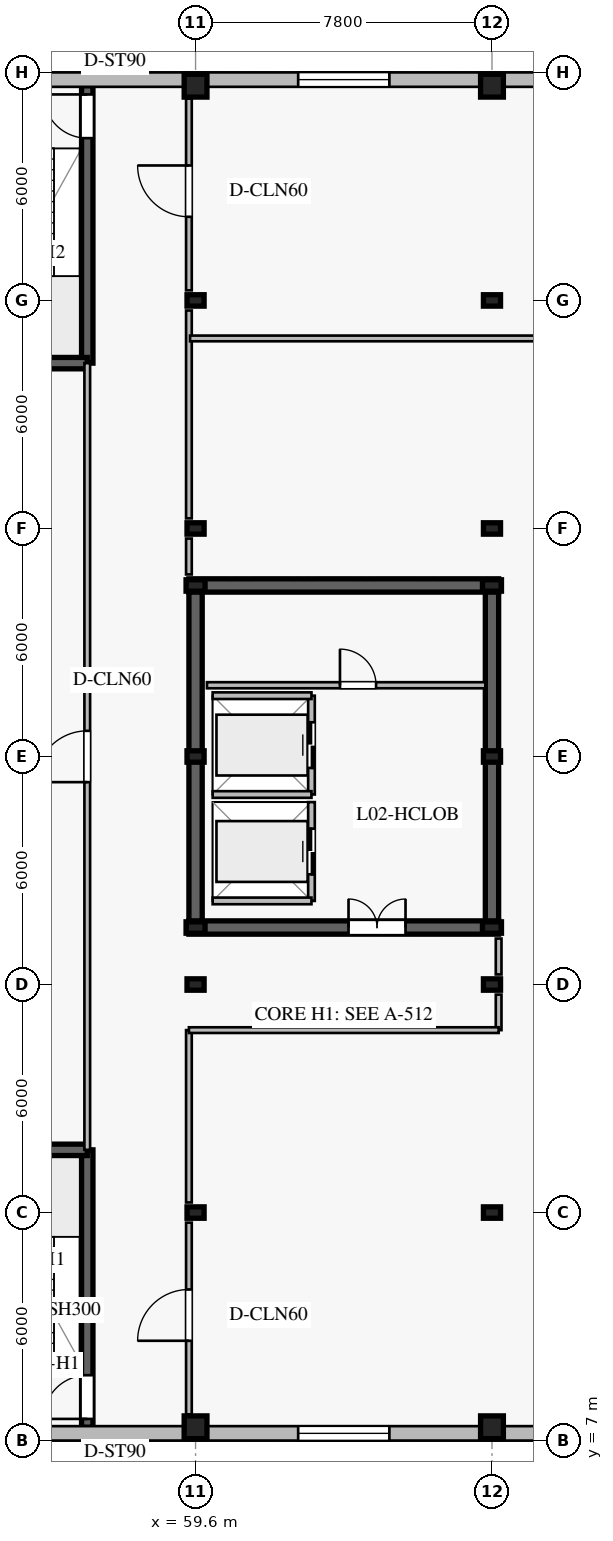
"""IFC4 building model, lengths in metres.
Left out: names, types, materials, properties, quantities, classifications, styles, units other than length and angle.
Written with IfcOpenShell. Run it as: python <this file> out.ifc"""

import sys

from ifc_helpers import new_model, si_unit, direction, frame, frame_2d, origin, origin_2d, place, context, subcontext, project, spatial, rectangle, i_section, extrude, element, fill, save


model = new_model("IFC4")
c1 = context("Model", 3, precision=1e-05, world=origin(), true_north=direction((0.0, 1.0)))
c2 = subcontext(c1, "Body", "Model", "MODEL_VIEW")
j1 = project(units=[si_unit("LENGTHUNIT", "METRE"), si_unit("PLANEANGLEUNIT", "RADIAN")], contexts=[c1])
p1 = place(None, origin())
s1 = spatial("IfcSite", under=j1, at=p1, CompositionType="ELEMENT")
p2 = place(p1, origin())
s2 = spatial("IfcBuilding", under=s1, at=p2, CompositionType="ELEMENT")
p3 = place(p2, frame((0.0, 0.0, 9.8)))
s3 = spatial("IfcBuildingStorey", under=s2, at=p3, CompositionType="ELEMENT", Elevation=9.8)
p4 = place(p3, frame((59.425, 20.5, 0.0), z_axis=(0.0, 0.0, 1.0), x_axis=(1.0, 0.0, 0.0)))
e1 = element("IfcWall", 1, at=p4, inside=s3, PredefinedType="SHEAR", context=c2, shape_type="SweptSolid", body=[
    extrude(rectangle(XDim=8.15, YDim=0.35, at=frame_2d((4.075, 0.0))), origin(), (0.0, 0.0, 1.0), 4.34),
])
p5 = place(p4, frame((4.2, 0.0, 0.0)))
e2 = element("IfcOpeningElement", 2, at=p5, cuts=e1, PredefinedType="OPENING", context=c2, shape_type="SweptSolid", body=[
    extrude(rectangle(XDim=1.5, YDim=2.2, at=frame_2d((0.75, 1.1))), frame((0.0, 0.185, 0.0), z_axis=(0.0, -1.0, 0.0), x_axis=(1.0, 0.0, 0.0)), (0.0, 0.0, 1.0), 0.37),
])
p6 = place(p3, frame((67.575, 29.5, 0.0), z_axis=(0.0, 0.0, 1.0), x_axis=(-1.0, 0.0, 0.0)))
e3 = element("IfcWall", 3, at=p6, inside=s3, PredefinedType="SHEAR", context=c2, shape_type="SweptSolid", body=[
    extrude(rectangle(XDim=8.15, YDim=0.35, at=frame_2d((4.075, 0.0))), origin(), (0.0, 0.0, 1.0), 4.34),
])
for number, where, z_axis, x_axis in (
    (4, (59.6, 29.325, 0.0), (0.0, 0.0, 1.0), (0.0, -1.0, 0.0)),
    (5, (67.4, 20.675, 0.0), (0.0, 0.0, 1.0), (0.0, 1.0, 0.0)),
):
    element("IfcWall", number, at=place(p3, frame(where, z_axis=z_axis, x_axis=x_axis)), inside=s3, PredefinedType="SHEAR", context=c2, shape_type="SweptSolid", body=[
        extrude(rectangle(XDim=8.65, YDim=0.35, at=frame_2d((4.325, 0.0))), origin(), (0.0, 0.0, 1.0), 4.34),
    ])
for number, where, z_axis, x_axis in (
    (6, (59.6, 20.5, 0.0), (0.0, 0.0, 1.0), (1.0, 0.0, 0.0)),
    (7, (67.4, 20.5, 0.0), (0.0, 0.0, 1.0), (1.0, 0.0, 0.0)),
    (8, (67.4, 29.5, 0.0), (0.0, 0.0, 1.0), (1.0, 0.0, 0.0)),
    (9, (59.6, 29.5, 0.0), (0.0, 0.0, 1.0), (1.0, 0.0, 0.0)),
):
    element("IfcColumn", number, at=place(p3, frame(where, z_axis=z_axis, x_axis=x_axis)), inside=s3, PredefinedType="COLUMN", context=c2, shape_type="SweptSolid", body=[
        extrude(i_section(OverallWidth=0.3, OverallDepth=0.5, WebThickness=0.014, FlangeThickness=0.028, at=origin_2d()), origin(), (0.0, 0.0, 1.0), 4.6),
    ])
p7 = place(p3, frame((56.75, 7.35, 0.0), z_axis=(0.0, 0.0, 1.0), x_axis=(0.0, 1.0, 0.0)))
e10 = element("IfcWall", 10, at=p7, inside=s3, PredefinedType="SOLIDWALL", context=c2, shape_type="SweptSolid", body=[
    extrude(rectangle(XDim=7.3, YDim=0.3, at=frame_2d((3.65, 0.0))), origin(), (0.0, 0.0, 1.0), 4.34),
])
p8 = place(p7, frame((0.22, 0.0, 0.0)))
e11 = element("IfcOpeningElement", 11, at=p8, cuts=e10, PredefinedType="OPENING", context=c2, shape_type="SweptSolid", body=[
    extrude(rectangle(XDim=1.15, YDim=2.2, at=frame_2d((0.575, 1.1))), frame((0.0, 0.16, 0.0), z_axis=(0.0, -1.0, 0.0), x_axis=(1.0, 0.0, 0.0)), (0.0, 0.0, 1.0), 0.32),
])
p9 = place(p3, frame((53.4, 14.65, 0.0), z_axis=(0.0, 0.0, 1.0), x_axis=(1.0, 0.0, 0.0)))
e12 = element("IfcWall", 12, at=p9, inside=s3, PredefinedType="SOLIDWALL", context=c2, shape_type="SweptSolid", body=[
    extrude(rectangle(XDim=3.35, YDim=0.3, at=frame_2d((1.675, 0.0))), origin(), (0.0, 0.0, 1.0), 4.34),
])
p10 = place(p3, frame((56.75, 35.35, 0.0), z_axis=(0.0, 0.0, 1.0), x_axis=(0.0, 1.0, 0.0)))
e13 = element("IfcWall", 13, at=p10, inside=s3, PredefinedType="SOLIDWALL", context=c2, shape_type="SweptSolid", body=[
    extrude(rectangle(XDim=7.3, YDim=0.3, at=frame_2d((3.65, 0.0))), origin(), (0.0, 0.0, 1.0), 4.34),
])
p11 = place(p10, frame((5.92, 0.0, 0.0)))
e14 = element("IfcOpeningElement", 14, at=p11, cuts=e13, PredefinedType="OPENING", context=c2, shape_type="SweptSolid", body=[
    extrude(rectangle(XDim=1.15, YDim=2.2, at=frame_2d((0.575, 1.1))), frame((0.0, 0.16, 0.0), z_axis=(0.0, -1.0, 0.0), x_axis=(1.0, 0.0, 0.0)), (0.0, 0.0, 1.0), 0.32),
])
p12 = place(p3, frame((53.4, 35.35, 0.0), z_axis=(0.0, 0.0, 1.0), x_axis=(1.0, 0.0, 0.0)))
e15 = element("IfcWall", 15, at=p12, inside=s3, PredefinedType="SOLIDWALL", context=c2, shape_type="SweptSolid", body=[
    extrude(rectangle(XDim=3.35, YDim=0.3, at=frame_2d((1.675, 0.0))), origin(), (0.0, 0.0, 1.0), 4.34),
])
p13 = place(p3, frame((59.6, 7.35, 0.0), z_axis=(0.0, 0.0, 1.0), x_axis=(1.0, 0.0, 0.0)))
e16 = element("IfcColumn", 16, at=p13, inside=s3, PredefinedType="COLUMN", context=c2, shape_type="SweptSolid", body=[
    extrude(rectangle(XDim=0.6, YDim=0.6, at=origin_2d()), origin(), (0.0, 0.0, 1.0), 4.6),
])
for number, where, z_axis, x_axis in (
    (17, (59.6, 13.0, 0.0), (0.0, 0.0, 1.0), (1.0, 0.0, 0.0)),
    (18, (59.6, 19.0, 0.0), (0.0, 0.0, 1.0), (1.0, 0.0, 0.0)),
    (19, (59.6, 25.0, 0.0), (0.0, 0.0, 1.0), (1.0, 0.0, 0.0)),
    (20, (59.6, 31.0, 0.0), (0.0, 0.0, 1.0), (1.0, 0.0, 0.0)),
    (21, (59.6, 37.0, 0.0), (0.0, 0.0, 1.0), (1.0, 0.0, 0.0)),
):
    element("IfcColumn", number, at=place(p3, frame(where, z_axis=z_axis, x_axis=x_axis)), inside=s3, PredefinedType="COLUMN", context=c2, shape_type="SweptSolid", body=[
        extrude(i_section(OverallWidth=0.3, OverallDepth=0.45, WebThickness=0.014, FlangeThickness=0.026, at=origin_2d()), origin(), (0.0, 0.0, 1.0), 4.6),
    ])
for number, where, z_axis, x_axis in (
    (22, (59.6, 42.65, 0.0), (0.0, 0.0, 1.0), (1.0, 0.0, 0.0)),
    (23, (67.4, 7.35, 0.0), (0.0, 0.0, 1.0), (1.0, 0.0, 0.0)),
):
    element("IfcColumn", number, at=place(p3, frame(where, z_axis=z_axis, x_axis=x_axis)), inside=s3, PredefinedType="COLUMN", context=c2, shape_type="SweptSolid", body=[
        extrude(rectangle(XDim=0.6, YDim=0.6, at=origin_2d()), origin(), (0.0, 0.0, 1.0), 4.6),
    ])
for number, where, z_axis, x_axis in (
    (24, (67.4, 13.0, 0.0), (0.0, 0.0, 1.0), (1.0, 0.0, 0.0)),
    (25, (67.4, 19.0, 0.0), (0.0, 0.0, 1.0), (1.0, 0.0, 0.0)),
    (26, (67.4, 25.0, 0.0), (0.0, 0.0, 1.0), (1.0, 0.0, 0.0)),
    (27, (67.4, 31.0, 0.0), (0.0, 0.0, 1.0), (1.0, 0.0, 0.0)),
    (28, (67.4, 37.0, 0.0), (0.0, 0.0, 1.0), (1.0, 0.0, 0.0)),
):
    element("IfcColumn", number, at=place(p3, frame(where, z_axis=z_axis, x_axis=x_axis)), inside=s3, PredefinedType="COLUMN", context=c2, shape_type="SweptSolid", body=[
        extrude(i_section(OverallWidth=0.3, OverallDepth=0.45, WebThickness=0.014, FlangeThickness=0.026, at=origin_2d()), origin(), (0.0, 0.0, 1.0), 4.6),
    ])
p14 = place(p3, frame((67.4, 42.65, 0.0), z_axis=(0.0, 0.0, 1.0), x_axis=(1.0, 0.0, 0.0)))
e29 = element("IfcColumn", 29, at=p14, inside=s3, PredefinedType="COLUMN", context=c2, shape_type="SweptSolid", body=[
    extrude(rectangle(XDim=0.6, YDim=0.6, at=origin_2d()), origin(), (0.0, 0.0, 1.0), 4.6),
])
p15 = place(p3, frame((75.0, 7.19, 0.0), z_axis=(0.0, 0.0, 1.0), x_axis=(-1.0, 0.0, 0.0)))
e30 = element("IfcWall", 30, at=p15, inside=s3, PredefinedType="STANDARD", context=c2, shape_type="SweptSolid", body=[
    extrude(rectangle(XDim=23.0, YDim=0.38, at=frame_2d((11.5, 0.0))), origin(), (0.0, 0.0, 1.0), 4.34),
])
p16 = place(p15, frame((10.3, 0.0, 0.95)))
e31 = element("IfcOpeningElement", 31, at=p16, cuts=e30, PredefinedType="OPENING", context=c2, shape_type="SweptSolid", body=[
    extrude(rectangle(XDim=2.4, YDim=1.8, at=frame_2d((1.2, 0.9))), frame((0.0, 0.2, 0.0), z_axis=(0.0, -1.0, 0.0), x_axis=(1.0, 0.0, 0.0)), (0.0, 0.0, 1.0), 0.4),
])
p17 = place(p3, frame((52.0, 42.81, 0.0), z_axis=(0.0, 0.0, 1.0), x_axis=(1.0, 0.0, 0.0)))
e32 = element("IfcWall", 32, at=p17, inside=s3, PredefinedType="STANDARD", context=c2, shape_type="SweptSolid", body=[
    extrude(rectangle(XDim=23.0, YDim=0.38, at=frame_2d((11.5, 0.0))), origin(), (0.0, 0.0, 1.0), 4.34),
])
p18 = place(p17, frame((10.3, 0.0, 0.95)))
e33 = element("IfcOpeningElement", 33, at=p18, cuts=e32, PredefinedType="OPENING", context=c2, shape_type="SweptSolid", body=[
    extrude(rectangle(XDim=2.4, YDim=1.8, at=frame_2d((1.2, 0.9))), frame((0.0, 0.2, 0.0), z_axis=(0.0, -1.0, 0.0), x_axis=(1.0, 0.0, 0.0)), (0.0, 0.0, 1.0), 0.4),
])
p19 = place(p3, frame((62.65, 21.2, 0.0), z_axis=(0.0, 0.0, 1.0), x_axis=(0.0, 1.0, 0.0)))
e34 = element("IfcWall", 34, at=p19, inside=s3, PredefinedType="PARTITIONING", context=c2, shape_type="SweptSolid", body=[
    extrude(rectangle(XDim=2.6, YDim=0.175, at=frame_2d((1.3, 0.0))), origin(), (0.0, 0.0, 1.0), 4.34),
])
p20 = place(p19, frame((0.7, 0.0, 0.0)))
e35 = element("IfcOpeningElement", 35, at=p20, cuts=e34, PredefinedType="OPENING", context=c2, shape_type="SweptSolid", body=[
    extrude(rectangle(XDim=1.2, YDim=2.2, at=frame_2d((0.6, 1.1))), frame((0.0, 0.098, 0.0), z_axis=(0.0, -1.0, 0.0), x_axis=(1.0, 0.0, 0.0)), (0.0, 0.0, 1.0), 0.195),
])
p21 = place(p3, frame((60.05, 21.2, 0.0), z_axis=(0.0, 0.0, 1.0), x_axis=(1.0, 0.0, 0.0)))
e36 = element("IfcWall", 36, at=p21, inside=s3, PredefinedType="PARTITIONING", context=c2, shape_type="SweptSolid", body=[
    extrude(rectangle(XDim=2.6, YDim=0.175, at=frame_2d((1.3, 0.0))), origin(), (0.0, 0.0, 1.0), 4.34),
])
p22 = place(p3, frame((62.65, 24.0, 0.0), z_axis=(0.0, 0.0, 1.0), x_axis=(0.0, 1.0, 0.0)))
e37 = element("IfcWall", 37, at=p22, inside=s3, PredefinedType="PARTITIONING", context=c2, shape_type="SweptSolid", body=[
    extrude(rectangle(XDim=2.6, YDim=0.175, at=frame_2d((1.3, 0.0))), origin(), (0.0, 0.0, 1.0), 3.98),
])
p23 = place(p22, frame((0.7, 0.0, 0.0)))
e38 = element("IfcOpeningElement", 38, at=p23, cuts=e37, PredefinedType="OPENING", context=c2, shape_type="SweptSolid", body=[
    extrude(rectangle(XDim=1.2, YDim=2.2, at=frame_2d((0.6, 1.1))), frame((0.0, 0.098, 0.0), z_axis=(0.0, -1.0, 0.0), x_axis=(1.0, 0.0, 0.0)), (0.0, 0.0, 1.0), 0.195),
])
for number, where, z_axis, x_axis in (
    (39, (60.05, 24.0, 0.0), (0.0, 0.0, 1.0), (1.0, 0.0, 0.0)),
    (40, (60.05, 26.6, 0.0), (0.0, 0.0, 1.0), (1.0, 0.0, 0.0)),
):
    element("IfcWall", number, at=place(p3, frame(where, z_axis=z_axis, x_axis=x_axis)), inside=s3, PredefinedType="PARTITIONING", context=c2, shape_type="SweptSolid", body=[
        extrude(rectangle(XDim=2.6, YDim=0.175, at=frame_2d((1.3, 0.0))), origin(), (0.0, 0.0, 1.0), 4.34),
    ])
p24 = place(p3, frame((59.9, 26.875, 0.0), z_axis=(0.0, 0.0, 1.0), x_axis=(1.0, 0.0, 0.0)))
e41 = element("IfcWall", 41, at=p24, inside=s3, PredefinedType="PLUMBINGWALL", context=c2, shape_type="SweptSolid", body=[
    extrude(rectangle(XDim=7.325, YDim=0.16, at=frame_2d((3.663, 0.0))), origin(), (0.0, 0.0, 1.0), 3.98),
])
p25 = place(p24, frame((3.5, 0.0, 0.0)))
e42 = element("IfcOpeningElement", 42, at=p25, cuts=e41, PredefinedType="OPENING", context=c2, shape_type="SweptSolid", body=[
    extrude(rectangle(XDim=0.95, YDim=2.1, at=frame_2d((0.475, 1.05))), frame((0.0, 0.09, 0.0), z_axis=(0.0, -1.0, 0.0), x_axis=(1.0, 0.0, 0.0)), (0.0, 0.0, 1.0), 0.18),
])
p26 = place(p3, frame((56.75, 14.65, 0.0), z_axis=(0.0, 0.0, 1.0), x_axis=(0.0, 1.0, 0.0)))
e43 = element("IfcWall", 43, at=p26, inside=s3, PredefinedType="PARTITIONING", context=c2, shape_type="SweptSolid", body=[
    extrude(rectangle(XDim=20.7, YDim=0.15, at=frame_2d((10.35, 0.0))), origin(), (0.0, 0.0, 1.0), 4.34),
])
p27 = place(p26, frame((9.675, 0.0, 0.0)))
e44 = element("IfcOpeningElement", 44, at=p27, cuts=e43, PredefinedType="OPENING", context=c2, shape_type="SweptSolid", body=[
    extrude(rectangle(XDim=1.35, YDim=2.2, at=frame_2d((0.675, 1.1))), frame((0.0, 0.085, 0.0), z_axis=(0.0, -1.0, 0.0), x_axis=(1.0, 0.0, 0.0)), (0.0, 0.0, 1.0), 0.17),
])
p28 = place(p3, frame((59.425, 7.69, 0.0), z_axis=(0.0, 0.0, 1.0), x_axis=(0.0, 1.0, 0.0)))
e45 = element("IfcWall", 45, at=p28, inside=s3, PredefinedType="PARTITIONING", context=c2, shape_type="SweptSolid", body=[
    extrude(rectangle(XDim=5.045, YDim=0.15, at=frame_2d((2.522, 0.0))), origin(), (0.0, 0.0, 1.0), 3.98),
])
p29 = place(p28, frame((1.936, 0.0, 0.0)))
e46 = element("IfcOpeningElement", 46, at=p29, cuts=e45, PredefinedType="OPENING", context=c2, shape_type="SweptSolid", body=[
    extrude(rectangle(XDim=1.35, YDim=2.2, at=frame_2d((0.675, 1.1))), frame((0.0, 0.085, 0.0), z_axis=(0.0, -1.0, 0.0), x_axis=(1.0, 0.0, 0.0)), (0.0, 0.0, 1.0), 0.17),
])
p30 = place(p3, frame((59.425, 13.265, 0.0), z_axis=(0.0, 0.0, 1.0), x_axis=(0.0, 1.0, 0.0)))
e47 = element("IfcWall", 47, at=p30, inside=s3, PredefinedType="PARTITIONING", context=c2, shape_type="SweptSolid", body=[
    extrude(rectangle(XDim=4.535, YDim=0.15, at=frame_2d((2.268, 0.0))), origin(), (0.0, 0.0, 1.0), 3.98),
])
p31 = place(p3, frame((59.425, 29.79, 0.0), z_axis=(0.0, 0.0, 1.0), x_axis=(0.0, 1.0, 0.0)))
e48 = element("IfcWall", 48, at=p31, inside=s3, PredefinedType="PARTITIONING", context=c2, shape_type="SweptSolid", body=[
    extrude(rectangle(XDim=0.945, YDim=0.15, at=frame_2d((0.473, 0.0))), origin(), (0.0, 0.0, 1.0), 3.98),
])
p32 = place(p3, frame((59.425, 31.265, 0.0), z_axis=(0.0, 0.0, 1.0), x_axis=(0.0, 1.0, 0.0)))
e49 = element("IfcWall", 49, at=p32, inside=s3, PredefinedType="PARTITIONING", context=c2, shape_type="SweptSolid", body=[
    extrude(rectangle(XDim=5.47, YDim=0.15, at=frame_2d((2.735, 0.0))), origin(), (0.0, 0.0, 1.0), 3.98),
])
p33 = place(p3, frame((59.425, 37.265, 0.0), z_axis=(0.0, 0.0, 1.0), x_axis=(0.0, 1.0, 0.0)))
e50 = element("IfcWall", 50, at=p33, inside=s3, PredefinedType="PARTITIONING", context=c2, shape_type="SweptSolid", body=[
    extrude(rectangle(XDim=5.045, YDim=0.15, at=frame_2d((2.522, 0.0))), origin(), (0.0, 0.0, 1.0), 3.98),
])
p34 = place(p33, frame((1.936, 0.0, 0.0)))
e51 = element("IfcOpeningElement", 51, at=p34, cuts=e50, PredefinedType="OPENING", context=c2, shape_type="SweptSolid", body=[
    extrude(rectangle(XDim=1.35, YDim=2.2, at=frame_2d((0.675, 1.1))), frame((0.0, 0.085, 0.0), z_axis=(0.0, -1.0, 0.0), x_axis=(1.0, 0.0, 0.0)), (0.0, 0.0, 1.0), 0.17),
])
p35 = place(p3, frame((67.575, 17.8, 0.0), z_axis=(0.0, 0.0, 1.0), x_axis=(0.0, 1.0, 0.0)))
e52 = element("IfcWall", 52, at=p35, inside=s3, PredefinedType="PARTITIONING", context=c2, shape_type="SweptSolid", body=[
    extrude(rectangle(XDim=0.935, YDim=0.15, at=frame_2d((0.468, 0.0))), origin(), (0.0, 0.0, 1.0), 3.98),
])
p36 = place(p3, frame((67.575, 19.265, 0.0), z_axis=(0.0, 0.0, 1.0), x_axis=(0.0, 1.0, 0.0)))
e53 = element("IfcWall", 53, at=p36, inside=s3, PredefinedType="PARTITIONING", context=c2, shape_type="SweptSolid", body=[
    extrude(rectangle(XDim=0.945, YDim=0.15, at=frame_2d((0.473, 0.0))), origin(), (0.0, 0.0, 1.0), 3.98),
])
p37 = place(p3, frame((59.425, 17.8, 0.0), z_axis=(0.0, 0.0, 1.0), x_axis=(1.0, 0.0, 0.0)))
e54 = element("IfcWall", 54, at=p37, inside=s3, PredefinedType="PARTITIONING", context=c2, shape_type="SweptSolid", body=[
    extrude(rectangle(XDim=8.15, YDim=0.15, at=frame_2d((4.075, 0.0))), origin(), (0.0, 0.0, 1.0), 3.98),
])
p38 = place(p3, frame((59.455, 36.0, 0.0), z_axis=(0.0, 0.0, 1.0), x_axis=(1.0, 0.0, 0.0)))
e55 = element("IfcWall", 55, at=p38, inside=s3, PredefinedType="PARTITIONING", context=c2, shape_type="SweptSolid", body=[
    extrude(rectangle(XDim=15.165, YDim=0.15, at=frame_2d((7.583, 0.0))), origin(), (0.0, 0.0, 1.0), 3.98),
])
p39 = place(p16, origin())
e56 = element("IfcWindow", 56, at=p39, inside=s3, PartitioningType="TRIPLE_PANEL_VERTICAL", PredefinedType="WINDOW", context=c2, shape_type="SweptSolid", body=[
    extrude(rectangle(XDim=2.4, YDim=1.8, at=frame_2d((1.2, 0.9))), frame((0.0, 0.03, 0.0), z_axis=(0.0, -1.0, 0.0), x_axis=(1.0, 0.0, 0.0)), (0.0, 0.0, 1.0), 0.06),
])
fill(e31, e56)
p40 = place(p18, origin())
e57 = element("IfcWindow", 57, at=p40, inside=s3, PartitioningType="TRIPLE_PANEL_VERTICAL", PredefinedType="WINDOW", context=c2, shape_type="SweptSolid", body=[
    extrude(rectangle(XDim=2.4, YDim=1.8, at=frame_2d((1.2, 0.9))), frame((0.0, 0.03, 0.0), z_axis=(0.0, -1.0, 0.0), x_axis=(1.0, 0.0, 0.0)), (0.0, 0.0, 1.0), 0.06),
])
fill(e33, e57)
p41 = place(p20, origin())
e58 = element("IfcDoor", 58, at=p41, inside=s3, OperationType="DOUBLE_DOOR_SLIDING", PredefinedType="DOOR", context=c2, shape_type="SweptSolid", body=[
    extrude(rectangle(XDim=1.2, YDim=2.2, at=frame_2d((0.6, 1.1))), frame((0.0, 0.025, 0.0), z_axis=(0.0, -1.0, 0.0), x_axis=(1.0, 0.0, 0.0)), (0.0, 0.0, 1.0), 0.05),
])
fill(e35, e58)
p42 = place(p23, origin())
e59 = element("IfcDoor", 59, at=p42, inside=s3, OperationType="DOUBLE_DOOR_SLIDING", PredefinedType="DOOR", context=c2, shape_type="SweptSolid", body=[
    extrude(rectangle(XDim=1.2, YDim=2.2, at=frame_2d((0.6, 1.1))), frame((0.0, 0.025, 0.0), z_axis=(0.0, -1.0, 0.0), x_axis=(1.0, 0.0, 0.0)), (0.0, 0.0, 1.0), 0.05),
])
fill(e38, e59)
p43 = place(p8, origin())
e60 = element("IfcDoor", 60, at=p43, inside=s3, OperationType="SINGLE_SWING_LEFT", PredefinedType="DOOR", context=c2, shape_type="SweptSolid", body=[
    extrude(rectangle(XDim=1.15, YDim=2.2, at=frame_2d((0.575, 1.1))), frame((0.0, 0.025, 0.0), z_axis=(0.0, -1.0, 0.0), x_axis=(1.0, 0.0, 0.0)), (0.0, 0.0, 1.0), 0.05),
])
fill(e11, e60)
p44 = place(p11, origin())
e61 = element("IfcDoor", 61, at=p44, inside=s3, OperationType="SINGLE_SWING_RIGHT", PredefinedType="DOOR", context=c2, shape_type="SweptSolid", body=[
    extrude(rectangle(XDim=1.15, YDim=2.2, at=frame_2d((0.575, 1.1))), frame((0.0, 0.025, 0.0), z_axis=(0.0, -1.0, 0.0), x_axis=(1.0, 0.0, 0.0)), (0.0, 0.0, 1.0), 0.05),
])
fill(e14, e61)
p45 = place(p5, origin())
e62 = element("IfcDoor", 62, at=p45, inside=s3, OperationType="DOUBLE_DOOR_SINGLE_SWING", PredefinedType="DOOR", context=c2, shape_type="SweptSolid", body=[
    extrude(rectangle(XDim=1.5, YDim=2.2, at=frame_2d((0.75, 1.1))), frame((0.0, 0.025, 0.0), z_axis=(0.0, -1.0, 0.0), x_axis=(1.0, 0.0, 0.0)), (0.0, 0.0, 1.0), 0.05),
])
fill(e2, e62)
p46 = place(p25, origin())
e63 = element("IfcDoor", 63, at=p46, inside=s3, OperationType="SINGLE_SWING_LEFT", PredefinedType="DOOR", context=c2, shape_type="SweptSolid", body=[
    extrude(rectangle(XDim=0.95, YDim=2.1, at=frame_2d((0.475, 1.05))), frame((0.0, 0.025, 0.0), z_axis=(0.0, -1.0, 0.0), x_axis=(1.0, 0.0, 0.0)), (0.0, 0.0, 1.0), 0.05),
])
fill(e42, e63)
p47 = place(p27, origin())
e64 = element("IfcDoor", 64, at=p47, inside=s3, OperationType="SINGLE_SWING_LEFT", PredefinedType="DOOR", context=c2, shape_type="SweptSolid", body=[
    extrude(rectangle(XDim=1.35, YDim=2.2, at=frame_2d((0.675, 1.1))), frame((0.0, 0.025, 0.0), z_axis=(0.0, -1.0, 0.0), x_axis=(1.0, 0.0, 0.0)), (0.0, 0.0, 1.0), 0.05),
])
fill(e44, e64)
p48 = place(p34, origin())
e65 = element("IfcDoor", 65, at=p48, inside=s3, OperationType="SINGLE_SWING_RIGHT", PredefinedType="DOOR", context=c2, shape_type="SweptSolid", body=[
    extrude(rectangle(XDim=1.35, YDim=2.2, at=frame_2d((0.675, 1.1))), frame((0.0, 0.025, 0.0), z_axis=(0.0, -1.0, 0.0), x_axis=(1.0, 0.0, 0.0)), (0.0, 0.0, 1.0), 0.05),
])
fill(e51, e65)
p49 = place(p29, origin())
e66 = element("IfcDoor", 66, at=p49, inside=s3, OperationType="SINGLE_SWING_LEFT", PredefinedType="DOOR", context=c2, shape_type="SweptSolid", body=[
    extrude(rectangle(XDim=1.35, YDim=2.2, at=frame_2d((0.675, 1.1))), frame((0.0, 0.025, 0.0), z_axis=(0.0, -1.0, 0.0), x_axis=(1.0, 0.0, 0.0)), (0.0, 0.0, 1.0), 0.05),
])
fill(e46, e66)
save(model, sys.argv[1])
